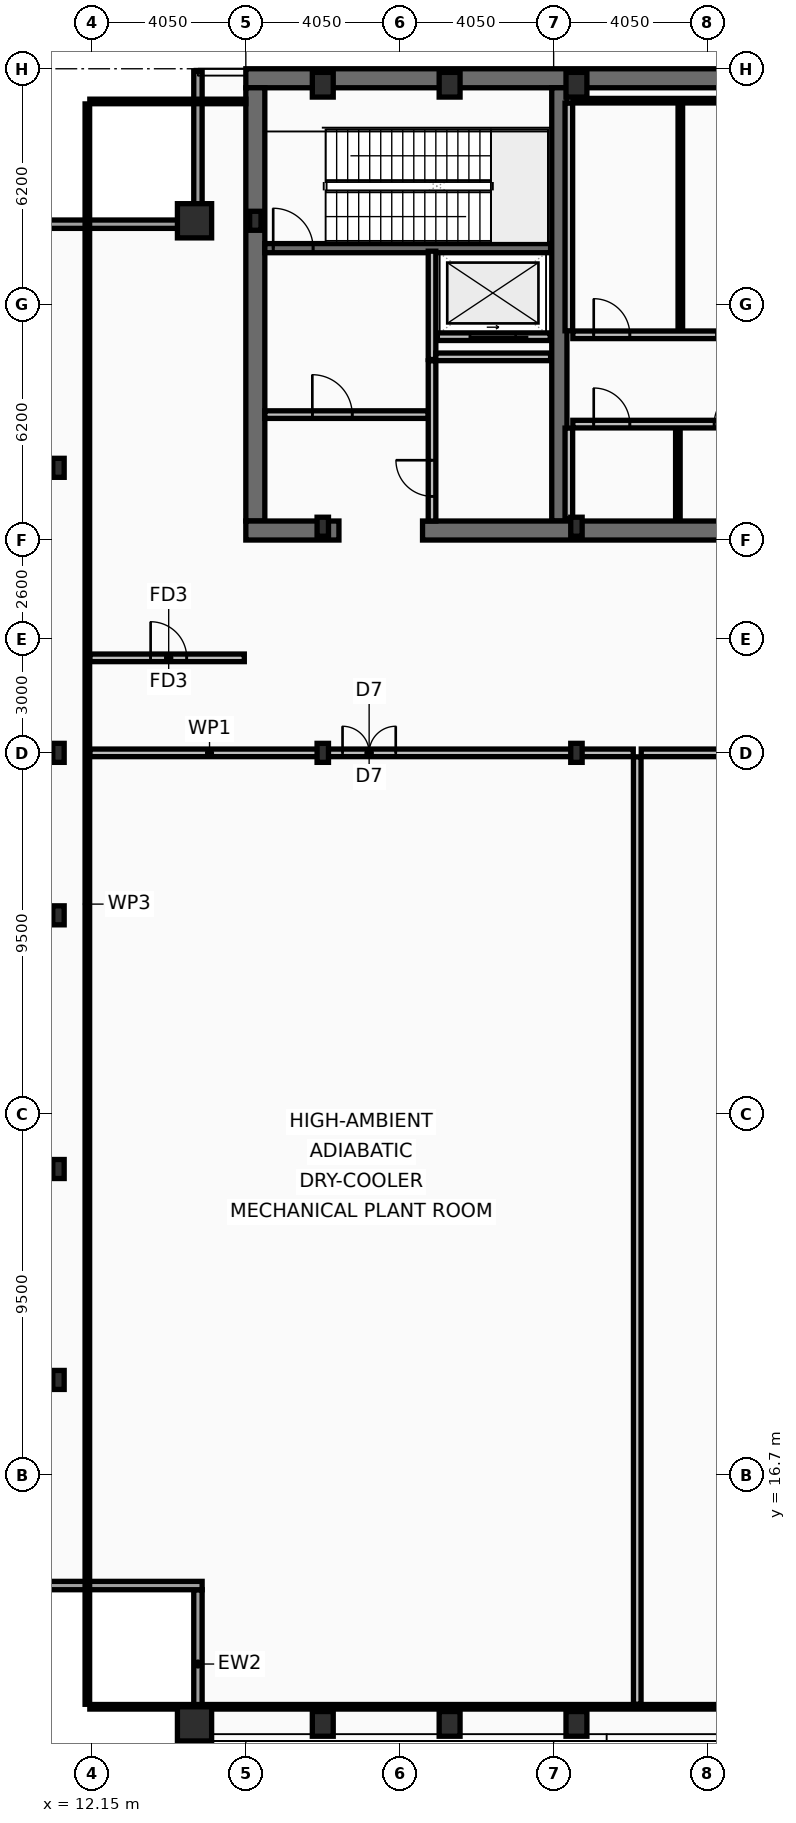
"""IFC4 building model, lengths in metres.
Left out: names, types, materials, properties, quantities, classifications, styles, units other than length and angle.
Written with IfcOpenShell. Run it as: python <this file> out.ifc"""

import sys

from ifc_helpers import new_model, si_unit, direction, frame, frame_2d, origin, origin_2d, place, context, subcontext, project, spatial, rectangle, hollow_rectangle, i_section, extrude, element, fill, save


model = new_model("IFC4")
c1 = context("Model", 3, precision=1e-05, world=origin(), true_north=direction((0.0, 1.0)))
c2 = subcontext(c1, "Body", "Model", "MODEL_VIEW")
j1 = project(units=[si_unit("LENGTHUNIT", "METRE"), si_unit("PLANEANGLEUNIT", "RADIAN")], contexts=[c1])
p1 = place(None, origin())
s1 = spatial("IfcSite", under=j1, at=p1, CompositionType="ELEMENT")
p2 = place(p1, origin())
s2 = spatial("IfcBuilding", under=s1, at=p2, CompositionType="ELEMENT")
p3 = place(p2, frame((0.0, 0.0, 361.8)))
s3 = spatial("IfcBuildingStorey", under=s2, at=p3, CompositionType="ELEMENT", Elevation=361.8)
p4 = place(p3, frame((16.2, 53.45, 0.0), z_axis=(0.0, 0.0, 1.0), x_axis=(1.0, 0.0, 0.0)))
e1 = element("IfcWall", 1, at=p4, inside=s3, PredefinedType="SHEAR", context=c2, shape_type="SweptSolid", body=[
    extrude(rectangle(XDim=40.5, YDim=0.5, at=frame_2d((20.25, 0.0))), origin(), (0.0, 0.0, 1.0), 5.4),
])
p5 = place(p3, frame((16.45, 41.8, 0.0), z_axis=(0.0, 0.0, 1.0), x_axis=(0.0, 1.0, 0.0)))
e2 = element("IfcWall", 2, at=p5, inside=s3, PredefinedType="SHEAR", context=c2, shape_type="SweptSolid", body=[
    extrude(rectangle(XDim=11.4, YDim=0.5, at=frame_2d((5.7, 0.0))), origin(), (0.0, 0.0, 1.0), 5.4),
])
p6 = place(p3, frame((24.45, 41.8, 0.0), z_axis=(0.0, 0.0, 1.0), x_axis=(0.0, 1.0, 0.0)))
e3 = element("IfcWall", 3, at=p6, inside=s3, PredefinedType="SHEAR", context=c2, shape_type="SweptSolid", body=[
    extrude(rectangle(XDim=11.4, YDim=0.4, at=frame_2d((5.7, 0.0))), origin(), (0.0, 0.0, 1.0), 5.4),
])
p7 = place(p3, frame((18.65, 41.55, 0.0), z_axis=(0.0, 0.0, 1.0), x_axis=(-1.0, 0.0, 0.0)))
e4 = element("IfcWall", 4, at=p7, inside=s3, PredefinedType="SHEAR", context=c2, shape_type="SweptSolid", body=[
    extrude(rectangle(XDim=2.45, YDim=0.5, at=frame_2d((1.225, 0.0))), origin(), (0.0, 0.0, 1.0), 5.4),
])
p8 = place(p3, frame((32.3, 41.55, 0.0), z_axis=(0.0, 0.0, 1.0), x_axis=(-1.0, 0.0, 0.0)))
e5 = element("IfcWall", 5, at=p8, inside=s3, PredefinedType="SHEAR", context=c2, shape_type="SweptSolid", body=[
    extrude(rectangle(XDim=11.45, YDim=0.5, at=frame_2d((5.725, 0.0))), origin(), (0.0, 0.0, 1.0), 5.4),
])
p9 = place(p3, frame((16.7, 48.98, 0.0), z_axis=(0.0, 0.0, 1.0), x_axis=(1.0, 0.0, 0.0)))
e6 = element("IfcWall", 6, at=p9, inside=s3, PredefinedType="SHEAR", context=c2, shape_type="SweptSolid", body=[
    extrude(rectangle(XDim=7.52, YDim=0.24, at=frame_2d((3.76, 0.0))), origin(), (0.0, 0.0, 1.0), 5.4),
])
p10 = place(p9, frame((0.22, 0.0, 0.0)))
e7 = element("IfcOpeningElement", 7, at=p10, cuts=e6, PredefinedType="OPENING", context=c2, shape_type="SweptSolid", body=[
    extrude(rectangle(XDim=1.05, YDim=2.15, at=frame_2d((0.525, 1.075))), frame((0.0, 0.13, 0.0), z_axis=(0.0, -1.0, 0.0), x_axis=(1.0, 0.0, 0.0)), (0.0, 0.0, 1.0), 0.26),
])
for number, where, z_axis, x_axis in (
    (8, (14.85, 10.15, 0.0), (0.0, 0.0, 1.0), (1.0, 0.0, 0.0)),
    (9, (14.85, 49.7, 0.0), (0.0, 0.0, 1.0), (1.0, 0.0, 0.0)),
):
    element("IfcColumn", number, at=place(p3, frame(where, z_axis=z_axis, x_axis=x_axis)), inside=s3, PredefinedType="COLUMN", context=c2, shape_type="SweptSolid", body=[
        extrude(hollow_rectangle(XDim=0.9, YDim=0.9, WallThickness=0.05, at=origin_2d()), origin(), (0.0, 0.0, 1.0), 5.6),
    ])
for number, where, z_axis, x_axis in (
    (10, (18.225, 10.15, 0.0), (0.0, 0.0, 1.0), (1.0, 0.0, 0.0)),
    (11, (21.562, 10.15, 0.0), (0.0, 0.0, 1.0), (1.0, 0.0, 0.0)),
    (12, (24.9, 10.15, 0.0), (0.0, 0.0, 1.0), (1.0, 0.0, 0.0)),
    (13, (18.225, 53.28, 0.0), (0.0, 0.0, 1.0), (1.0, 0.0, 0.0)),
    (14, (21.562, 53.28, 0.0), (0.0, 0.0, 1.0), (1.0, 0.0, 0.0)),
    (15, (24.9, 53.28, 0.0), (0.0, 0.0, 1.0), (1.0, 0.0, 0.0)),
):
    element("IfcColumn", number, at=place(p3, frame(where, z_axis=z_axis, x_axis=x_axis)), inside=s3, PredefinedType="COLUMN", context=c2, shape_type="SweptSolid", body=[
        extrude(hollow_rectangle(XDim=0.55, YDim=0.65, WallThickness=0.04, at=origin_2d()), origin(), (0.0, 0.0, 1.0), 5.6),
    ])
for number, where, z_axis, x_axis in (
    (16, (11.27, 19.2, 0.0), (0.0, 0.0, 1.0), (1.0, 0.0, 0.0)),
    (17, (11.27, 24.75, 0.0), (0.0, 0.0, 1.0), (1.0, 0.0, 0.0)),
    (18, (11.27, 31.425, 0.0), (0.0, 0.0, 1.0), (1.0, 0.0, 0.0)),
    (19, (11.27, 35.7, 0.0), (0.0, 0.0, 1.0), (1.0, 0.0, 0.0)),
    (20, (11.27, 43.2, 0.0), (0.0, 0.0, 1.0), (1.0, 0.0, 0.0)),
    (21, (16.45, 49.7, 0.0), (0.0, 0.0, 1.0), (1.0, 0.0, 0.0)),
    (22, (18.225, 35.7, 0.0), (0.0, 0.0, 1.0), (1.0, 0.0, 0.0)),
    (23, (18.225, 41.65, 0.0), (0.0, 0.0, 1.0), (1.0, 0.0, 0.0)),
    (24, (24.9, 35.7, 0.0), (0.0, 0.0, 1.0), (1.0, 0.0, 0.0)),
    (25, (24.9, 41.65, 0.0), (0.0, 0.0, 1.0), (1.0, 0.0, 0.0)),
):
    element("IfcColumn", number, at=place(p3, frame(where, z_axis=z_axis, x_axis=x_axis)), inside=s3, PredefinedType="COLUMN", context=c2, shape_type="SweptSolid", body=[
        extrude(i_section(OverallWidth=0.3, OverallDepth=0.5, WebThickness=0.014, FlangeThickness=0.028, at=origin_2d()), origin(), (0.0, 0.0, 1.0), 5.6),
    ])
p11 = place(p3, frame((14.94, 9.77, 0.0), z_axis=(0.0, 0.0, 1.0), x_axis=(0.0, 1.0, 0.0)))
e26 = element("IfcWall", 26, at=p11, inside=s3, PredefinedType="SOLIDWALL", context=c2, shape_type="SweptSolid", body=[
    extrude(rectangle(XDim=3.91, YDim=0.22, at=frame_2d((1.955, 0.0))), origin(), (0.0, 0.0, 1.0), 4.84),
])
for number, where, z_axis, x_axis in (
    (27, (15.05, 13.79, 0.0), (0.0, 0.0, 1.0), (-1.0, 0.0, 0.0)),
    (28, (10.92, 49.61, 0.0), (0.0, 0.0, 1.0), (1.0, 0.0, 0.0)),
):
    element("IfcWall", number, at=place(p3, frame(where, z_axis=z_axis, x_axis=x_axis)), inside=s3, PredefinedType="SOLIDWALL", context=c2, shape_type="SweptSolid", body=[
        extrude(rectangle(XDim=4.13, YDim=0.22, at=frame_2d((2.065, 0.0))), origin(), (0.0, 0.0, 1.0), 4.84),
    ])
p12 = place(p3, frame((14.94, 49.72, 0.0), z_axis=(0.0, 0.0, 1.0), x_axis=(0.0, 1.0, 0.0)))
e29 = element("IfcWall", 29, at=p12, inside=s3, PredefinedType="SOLIDWALL", context=c2, shape_type="SweptSolid", body=[
    extrude(rectangle(XDim=3.91, YDim=0.22, at=frame_2d((1.955, 0.0))), origin(), (0.0, 0.0, 1.0), 4.84),
])
p13 = place(p3, frame((24.21, 46.65, 0.0), z_axis=(0.0, 0.0, 1.0), x_axis=(-1.0, 0.0, 0.0)))
e30 = element("IfcWall", 30, at=p13, inside=s3, PredefinedType="PARTITIONING", context=c2, shape_type="SweptSolid", body=[
    extrude(rectangle(XDim=2.97, YDim=0.2, at=frame_2d((1.485, 0.0))), origin(), (0.0, 0.0, 1.0), 5.4),
])
p14 = place(p13, frame((0.91, 0.0, 0.0)))
e31 = element("IfcOpeningElement", 31, at=p14, cuts=e30, PredefinedType="OPENING", context=c2, shape_type="SweptSolid", body=[
    extrude(rectangle(XDim=1.2, YDim=2.18, at=frame_2d((0.6, 1.09))), frame((0.0, 0.11, 0.0), z_axis=(0.0, -1.0, 0.0), x_axis=(1.0, 0.0, 0.0)), (0.0, 0.0, 1.0), 0.22),
])
p15 = place(p3, frame((21.1, 46.05, 0.0), z_axis=(0.0, 0.0, 1.0), x_axis=(0.0, 1.0, 0.0)))
e32 = element("IfcWall", 32, at=p15, inside=s3, PredefinedType="PARTITIONING", context=c2, shape_type="SweptSolid", body=[
    extrude(rectangle(XDim=2.85, YDim=0.2, at=frame_2d((1.425, 0.0))), origin(), (0.0, 0.0, 1.0), 5.4),
])
p16 = place(p3, frame((16.7, 44.6, 0.0), z_axis=(0.0, 0.0, 1.0), x_axis=(1.0, 0.0, 0.0)))
e33 = element("IfcWall", 33, at=p16, inside=s3, PredefinedType="PARTITIONING", context=c2, shape_type="SweptSolid", body=[
    extrude(rectangle(XDim=4.3, YDim=0.2, at=frame_2d((2.15, 0.0))), origin(), (0.0, 0.0, 1.0), 5.4),
])
p17 = place(p16, frame((1.25, 0.0, 0.0)))
e34 = element("IfcOpeningElement", 34, at=p17, cuts=e33, PredefinedType="OPENING", context=c2, shape_type="SweptSolid", body=[
    extrude(rectangle(XDim=1.05, YDim=2.15, at=frame_2d((0.525, 1.075))), frame((0.0, 0.11, 0.0), z_axis=(0.0, -1.0, 0.0), x_axis=(1.0, 0.0, 0.0)), (0.0, 0.0, 1.0), 0.22),
])
p18 = place(p3, frame((21.2, 46.12, 0.0), z_axis=(0.0, 0.0, 1.0), x_axis=(1.0, 0.0, 0.0)))
e35 = element("IfcWall", 35, at=p18, inside=s3, PredefinedType="PARTITIONING", context=c2, shape_type="SweptSolid", body=[
    extrude(rectangle(XDim=3.02, YDim=0.2, at=frame_2d((1.51, 0.0))), origin(), (0.0, 0.0, 1.0), 5.4),
])
p19 = place(p3, frame((21.1, 41.8, 0.0), z_axis=(0.0, 0.0, 1.0), x_axis=(0.0, 1.0, 0.0)))
e36 = element("IfcWall", 36, at=p19, inside=s3, PredefinedType="PARTITIONING", context=c2, shape_type="SweptSolid", body=[
    extrude(rectangle(XDim=4.215, YDim=0.2, at=frame_2d((2.107, 0.0))), origin(), (0.0, 0.0, 1.0), 5.4),
])
p20 = place(p19, frame((0.65, 0.0, 0.0)))
e37 = element("IfcOpeningElement", 37, at=p20, cuts=e36, PredefinedType="OPENING", context=c2, shape_type="SweptSolid", body=[
    extrude(rectangle(XDim=0.95, YDim=2.1, at=frame_2d((0.475, 1.05))), frame((0.0, 0.11, 0.0), z_axis=(0.0, -1.0, 0.0), x_axis=(1.0, 0.0, 0.0)), (0.0, 0.0, 1.0), 0.22),
])
p21 = place(p3, frame((24.7, 46.805, 0.0), z_axis=(0.0, 0.0, 1.0), x_axis=(0.0, 1.0, 0.0)))
e38 = element("IfcWall", 38, at=p21, inside=s3, PredefinedType="PARTITIONING", context=c2, shape_type="SweptSolid", body=[
    extrude(rectangle(XDim=5.99, YDim=0.2, at=frame_2d((2.995, 0.0))), origin(), (0.0, 0.0, 1.0), 5.4),
])
p22 = place(p3, frame((24.805, 52.86, 0.0), z_axis=(0.0, 0.0, 1.0), x_axis=(1.0, 0.0, 0.0)))
e39 = element("IfcWall", 39, at=p22, inside=s3, PredefinedType="PARTITIONING", context=c2, shape_type="SweptSolid", body=[
    extrude(rectangle(XDim=7.51, YDim=0.12, at=frame_2d((3.755, 0.0))), origin(), (0.0, 0.0, 1.0), 5.4),
])
p23 = place(p3, frame((27.634, 46.805, 0.0), z_axis=(0.0, 0.0, 1.0), x_axis=(0.0, 1.0, 0.0)))
e40 = element("IfcWall", 40, at=p23, inside=s3, PredefinedType="PARTITIONING", context=c2, shape_type="SweptSolid", body=[
    extrude(rectangle(XDim=5.99, YDim=0.12, at=frame_2d((2.995, 0.0))), origin(), (0.0, 0.0, 1.0), 5.4),
])
p24 = place(p3, frame((24.805, 46.7, 0.0), z_axis=(0.0, 0.0, 1.0), x_axis=(1.0, 0.0, 0.0)))
e41 = element("IfcWall", 41, at=p24, inside=s3, PredefinedType="PARTITIONING", context=c2, shape_type="SweptSolid", body=[
    extrude(rectangle(XDim=7.51, YDim=0.2, at=frame_2d((3.755, 0.0))), origin(), (0.0, 0.0, 1.0), 5.4),
])
p25 = place(p24, frame((0.55, 0.0, 0.0)))
e42 = element("IfcOpeningElement", 42, at=p25, cuts=e41, PredefinedType="OPENING", context=c2, shape_type="SweptSolid", body=[
    extrude(rectangle(XDim=0.95, YDim=2.1, at=frame_2d((0.475, 1.05))), frame((0.0, 0.11, 0.0), z_axis=(0.0, -1.0, 0.0), x_axis=(1.0, 0.0, 0.0)), (0.0, 0.0, 1.0), 0.22),
])
p26 = place(p24, frame((3.784, 0.0, 0.0)))
e43 = element("IfcOpeningElement", 43, at=p26, cuts=e41, PredefinedType="OPENING", context=c2, shape_type="SweptSolid", body=[
    extrude(rectangle(XDim=0.95, YDim=2.1, at=frame_2d((0.475, 1.05))), frame((0.0, 0.11, 0.0), z_axis=(0.0, -1.0, 0.0), x_axis=(1.0, 0.0, 0.0)), (0.0, 0.0, 1.0), 0.22),
])
p27 = place(p3, frame((24.7, 41.85, 0.0), z_axis=(0.0, 0.0, 1.0), x_axis=(0.0, 1.0, 0.0)))
e44 = element("IfcWall", 44, at=p27, inside=s3, PredefinedType="PARTITIONING", context=c2, shape_type="SweptSolid", body=[
    extrude(rectangle(XDim=2.395, YDim=0.2, at=frame_2d((1.198, 0.0))), origin(), (0.0, 0.0, 1.0), 5.4),
])
p28 = place(p3, frame((27.569, 41.85, 0.0), z_axis=(0.0, 0.0, 1.0), x_axis=(0.0, 1.0, 0.0)))
e45 = element("IfcWall", 45, at=p28, inside=s3, PredefinedType="PARTITIONING", context=c2, shape_type="SweptSolid", body=[
    extrude(rectangle(XDim=2.395, YDim=0.12, at=frame_2d((1.198, 0.0))), origin(), (0.0, 0.0, 1.0), 5.4),
])
p29 = place(p3, frame((24.805, 44.35, 0.0), z_axis=(0.0, 0.0, 1.0), x_axis=(1.0, 0.0, 0.0)))
e46 = element("IfcWall", 46, at=p29, inside=s3, PredefinedType="PARTITIONING", context=c2, shape_type="SweptSolid", body=[
    extrude(rectangle(XDim=7.34, YDim=0.2, at=frame_2d((3.67, 0.0))), origin(), (0.0, 0.0, 1.0), 5.4),
])
p30 = place(p29, frame((0.55, 0.0, 0.0)))
e47 = element("IfcOpeningElement", 47, at=p30, cuts=e46, PredefinedType="OPENING", context=c2, shape_type="SweptSolid", body=[
    extrude(rectangle(XDim=0.95, YDim=2.1, at=frame_2d((0.475, 1.05))), frame((0.0, 0.11, 0.0), z_axis=(0.0, -1.0, 0.0), x_axis=(1.0, 0.0, 0.0)), (0.0, 0.0, 1.0), 0.22),
])
p31 = place(p29, frame((3.719, 0.0, 0.0)))
e48 = element("IfcOpeningElement", 48, at=p31, cuts=e46, PredefinedType="OPENING", context=c2, shape_type="SweptSolid", body=[
    extrude(rectangle(XDim=0.95, YDim=2.1, at=frame_2d((0.475, 1.05))), frame((0.0, 0.11, 0.0), z_axis=(0.0, -1.0, 0.0), x_axis=(1.0, 0.0, 0.0)), (0.0, 0.0, 1.0), 0.22),
])
p32 = place(p3, frame((12.095, 35.7, 0.0), z_axis=(0.0, 0.0, 1.0), x_axis=(1.0, 0.0, 0.0)))
e49 = element("IfcWall", 49, at=p32, inside=s3, PredefinedType="PARTITIONING", context=c2, shape_type="SweptSolid", body=[
    extrude(rectangle(XDim=14.3, YDim=0.2, at=frame_2d((7.15, 0.0))), origin(), (0.0, 0.0, 1.0), 4.79),
])
p33 = place(p32, frame((6.65, 0.0, 0.0)))
e50 = element("IfcOpeningElement", 50, at=p33, cuts=e49, PredefinedType="OPENING", context=c2, shape_type="SweptSolid", body=[
    extrude(rectangle(XDim=1.4, YDim=2.15, at=frame_2d((0.7, 1.075))), frame((0.0, 0.11, 0.0), z_axis=(0.0, -1.0, 0.0), x_axis=(1.0, 0.0, 0.0)), (0.0, 0.0, 1.0), 0.22),
])
p34 = place(p3, frame((26.605, 35.7, 0.0), z_axis=(0.0, 0.0, 1.0), x_axis=(1.0, 0.0, 0.0)))
e51 = element("IfcWall", 51, at=p34, inside=s3, PredefinedType="PARTITIONING", context=c2, shape_type="SweptSolid", body=[
    extrude(rectangle(XDim=19.69, YDim=0.2, at=frame_2d((9.845, 0.0))), origin(), (0.0, 0.0, 1.0), 5.03),
])
p35 = place(p34, frame((8.5, 0.0, 0.0)))
e52 = element("IfcOpeningElement", 52, at=p35, cuts=e51, PredefinedType="OPENING", context=c2, shape_type="SweptSolid", body=[
    extrude(rectangle(XDim=1.4, YDim=2.15, at=frame_2d((0.7, 1.075))), frame((0.0, 0.11, 0.0), z_axis=(0.0, -1.0, 0.0), x_axis=(1.0, 0.0, 0.0)), (0.0, 0.0, 1.0), 0.22),
])
p36 = place(p3, frame((26.5, 10.665, 0.0), z_axis=(0.0, 0.0, 1.0), x_axis=(0.0, 1.0, 0.0)))
e53 = element("IfcWall", 53, at=p36, inside=s3, PredefinedType="PARTITIONING", context=c2, shape_type="SweptSolid", body=[
    extrude(rectangle(XDim=24.93, YDim=0.2, at=frame_2d((12.465, 0.0))), origin(), (0.0, 0.0, 1.0), 5.03),
])
p37 = place(p3, frame((12.095, 38.2, 0.0), z_axis=(0.0, 0.0, 1.0), x_axis=(1.0, 0.0, 0.0)))
e54 = element("IfcWall", 54, at=p37, inside=s3, PredefinedType="PARTITIONING", context=c2, shape_type="SweptSolid", body=[
    extrude(rectangle(XDim=4.065, YDim=0.2, at=frame_2d((2.032, 0.0))), origin(), (0.0, 0.0, 1.0), 5.4),
])
p38 = place(p37, frame((1.6, 0.0, 0.0)))
e55 = element("IfcOpeningElement", 55, at=p38, cuts=e54, PredefinedType="OPENING", context=c2, shape_type="SweptSolid", body=[
    extrude(rectangle(XDim=0.95, YDim=2.1, at=frame_2d((0.475, 1.05))), frame((0.0, 0.11, 0.0), z_axis=(0.0, -1.0, 0.0), x_axis=(1.0, 0.0, 0.0)), (0.0, 0.0, 1.0), 0.22),
])
p39 = place(p3, frame((12.03, 10.665, 0.0), z_axis=(0.0, 0.0, 1.0), x_axis=(0.0, 1.0, 0.0)))
e56 = element("IfcWall", 56, at=p39, inside=s3, PredefinedType="PARTITIONING", context=c2, shape_type="SweptSolid", body=[
    extrude(rectangle(XDim=42.11, YDim=0.12, at=frame_2d((21.055, 0.0))), origin(), (0.0, 0.0, 1.0), 4.79),
])
p40 = place(p3, frame((12.095, 52.84, 0.0), z_axis=(0.0, 0.0, 1.0), x_axis=(1.0, 0.0, 0.0)))
e57 = element("IfcWall", 57, at=p40, inside=s3, PredefinedType="PARTITIONING", context=c2, shape_type="SweptSolid", body=[
    extrude(rectangle(XDim=4.105, YDim=0.12, at=frame_2d((2.052, 0.0))), origin(), (0.0, 0.0, 1.0), 5.4),
])
p41 = place(p3, frame((12.095, 10.6, 0.0), z_axis=(0.0, 0.0, 1.0), x_axis=(1.0, 0.0, 0.0)))
e58 = element("IfcWall", 58, at=p41, inside=s3, PredefinedType="PARTITIONING", context=c2, shape_type="SweptSolid", body=[
    extrude(rectangle(XDim=48.71, YDim=0.12, at=frame_2d((24.355, 0.0))), origin(), (0.0, 0.0, 1.0), 4.79),
])
p42 = place(p10, origin())
e59 = element("IfcDoor", 59, at=p42, inside=s3, OperationType="SINGLE_SWING_LEFT", PredefinedType="DOOR", context=c2, shape_type="SweptSolid", body=[
    extrude(rectangle(XDim=1.05, YDim=2.15, at=frame_2d((0.525, 1.075))), frame((0.0, 0.025, 0.0), z_axis=(0.0, -1.0, 0.0), x_axis=(1.0, 0.0, 0.0)), (0.0, 0.0, 1.0), 0.05),
])
fill(e7, e59)
p43 = place(p14, origin())
e60 = element("IfcDoor", 60, at=p43, inside=s3, OperationType="SLIDING_TO_LEFT", PredefinedType="DOOR", context=c2, shape_type="SweptSolid", body=[
    extrude(rectangle(XDim=1.2, YDim=2.18, at=frame_2d((0.6, 1.09))), frame((0.0, 0.025, 0.0), z_axis=(0.0, -1.0, 0.0), x_axis=(1.0, 0.0, 0.0)), (0.0, 0.0, 1.0), 0.05),
])
fill(e31, e60)
p44 = place(p17, origin())
e61 = element("IfcDoor", 61, at=p44, inside=s3, OperationType="SINGLE_SWING_LEFT", PredefinedType="DOOR", context=c2, shape_type="SweptSolid", body=[
    extrude(rectangle(XDim=1.05, YDim=2.15, at=frame_2d((0.525, 1.075))), frame((0.0, 0.025, 0.0), z_axis=(0.0, -1.0, 0.0), x_axis=(1.0, 0.0, 0.0)), (0.0, 0.0, 1.0), 0.05),
])
fill(e34, e61)
p45 = place(p20, origin())
e62 = element("IfcDoor", 62, at=p45, inside=s3, OperationType="SINGLE_SWING_RIGHT", PredefinedType="DOOR", context=c2, shape_type="SweptSolid", body=[
    extrude(rectangle(XDim=0.95, YDim=2.1, at=frame_2d((0.475, 1.05))), frame((0.0, 0.025, 0.0), z_axis=(0.0, -1.0, 0.0), x_axis=(1.0, 0.0, 0.0)), (0.0, 0.0, 1.0), 0.05),
])
fill(e37, e62)
p46 = place(p25, origin())
e63 = element("IfcDoor", 63, at=p46, inside=s3, OperationType="SINGLE_SWING_LEFT", PredefinedType="DOOR", context=c2, shape_type="SweptSolid", body=[
    extrude(rectangle(XDim=0.95, YDim=2.1, at=frame_2d((0.475, 1.05))), frame((0.0, 0.025, 0.0), z_axis=(0.0, -1.0, 0.0), x_axis=(1.0, 0.0, 0.0)), (0.0, 0.0, 1.0), 0.05),
])
fill(e42, e63)
p47 = place(p30, origin())
e64 = element("IfcDoor", 64, at=p47, inside=s3, OperationType="SINGLE_SWING_LEFT", PredefinedType="DOOR", context=c2, shape_type="SweptSolid", body=[
    extrude(rectangle(XDim=0.95, YDim=2.1, at=frame_2d((0.475, 1.05))), frame((0.0, 0.025, 0.0), z_axis=(0.0, -1.0, 0.0), x_axis=(1.0, 0.0, 0.0)), (0.0, 0.0, 1.0), 0.05),
])
fill(e47, e64)
p48 = place(p31, origin())
e65 = element("IfcDoor", 65, at=p48, inside=s3, OperationType="SINGLE_SWING_RIGHT", PredefinedType="DOOR", context=c2, shape_type="SweptSolid", body=[
    extrude(rectangle(XDim=0.95, YDim=2.1, at=frame_2d((0.475, 1.05))), frame((0.0, 0.025, 0.0), z_axis=(0.0, -1.0, 0.0), x_axis=(1.0, 0.0, 0.0)), (0.0, 0.0, 1.0), 0.05),
])
fill(e48, e65)
p49 = place(p33, origin())
e66 = element("IfcDoor", 66, at=p49, inside=s3, OperationType="DOUBLE_DOOR_SINGLE_SWING", PredefinedType="DOOR", context=c2, shape_type="SweptSolid", body=[
    extrude(rectangle(XDim=1.4, YDim=2.15, at=frame_2d((0.7, 1.075))), frame((0.0, 0.025, 0.0), z_axis=(0.0, -1.0, 0.0), x_axis=(1.0, 0.0, 0.0)), (0.0, 0.0, 1.0), 0.05),
])
fill(e50, e66)
p50 = place(p38, origin())
e67 = element("IfcDoor", 67, at=p50, inside=s3, OperationType="SINGLE_SWING_LEFT", PredefinedType="DOOR", context=c2, shape_type="SweptSolid", body=[
    extrude(rectangle(XDim=0.95, YDim=2.1, at=frame_2d((0.475, 1.05))), frame((0.0, 0.025, 0.0), z_axis=(0.0, -1.0, 0.0), x_axis=(1.0, 0.0, 0.0)), (0.0, 0.0, 1.0), 0.05),
])
fill(e55, e67)
save(model, sys.argv[1])
